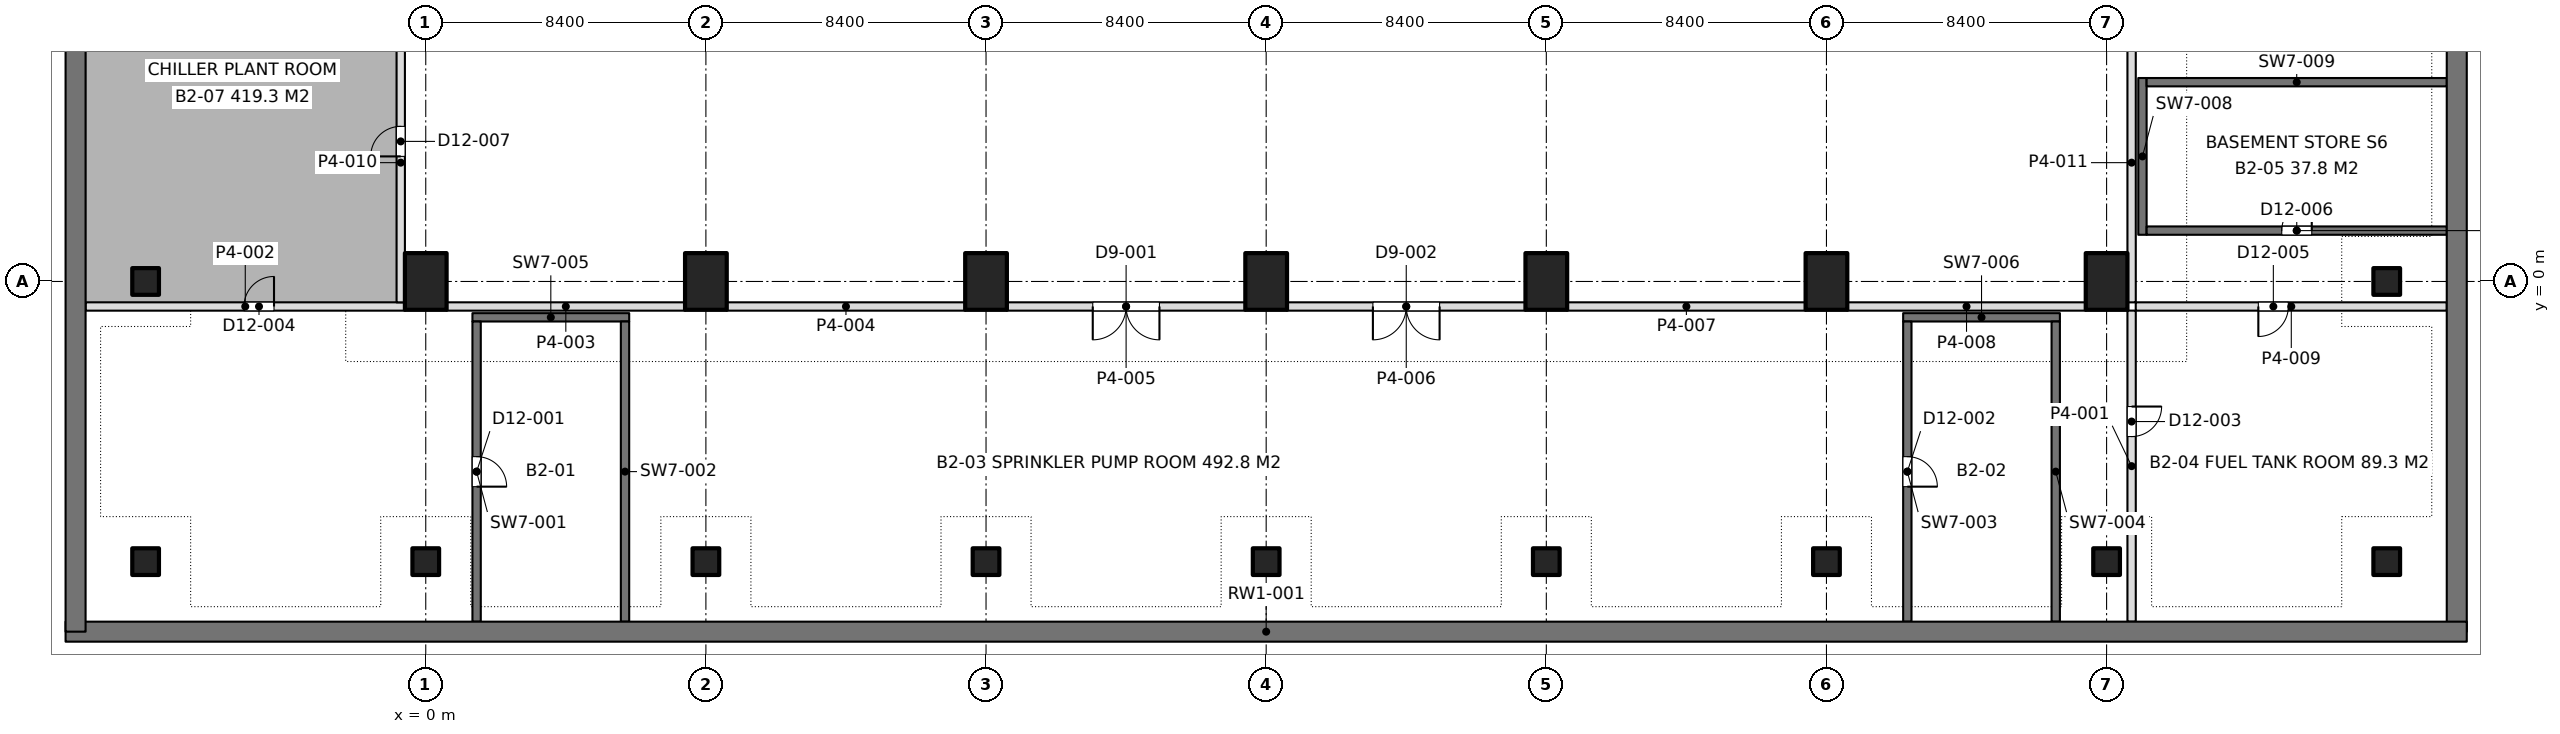
"""IFC4 building model, lengths in metres.
Left out: names, types, materials, properties, quantities, classifications, styles, units other than length and angle.
Written with IfcOpenShell. Run it as: python <this file> out.ifc"""

import sys

from ifc_helpers import new_model, si_unit, direction, frame, frame_2d, origin, origin_with_axes, origin_2d, place, context, subcontext, project, spatial, rectangle, extrude, element, fill, save


model = new_model("IFC4")
c1 = context("Model", 3, precision=1e-05, world=origin(), true_north=direction((0.0, 1.0)))
c2 = subcontext(c1, "Body", "Model", "MODEL_VIEW")
j1 = project(units=[si_unit("LENGTHUNIT", "METRE"), si_unit("PLANEANGLEUNIT", "RADIAN")], contexts=[c1])
p1 = place(None, origin())
s1 = spatial("IfcSite", under=j1, at=p1, CompositionType="ELEMENT")
p2 = place(p1, origin())
s2 = spatial("IfcBuilding", under=s1, at=p2, CompositionType="ELEMENT")
p3 = place(p2, frame((0.0, 0.0, -8.4)))
s3 = spatial("IfcBuildingStorey", under=s2, at=p3, CompositionType="ELEMENT", Elevation=-8.4)
p4 = place(p3, frame((-10.8, -10.5, 0.0), z_axis=(0.0, 0.0, 1.0), x_axis=(1.0, 0.0, 0.0)))
e1 = element("IfcWall", 1, at=p4, inside=s3, PredefinedType="SOLIDWALL", context=c2, shape_type="SweptSolid", body=[
    extrude(rectangle(XDim=72.0, YDim=0.6, at=frame_2d((36.0, 0.0))), origin(), (0.0, 0.0, 1.0), 4.2),
])
for number, where, z_axis, x_axis in (
    (2, (-10.5, -10.5, 0.0), (0.0, 0.0, 1.0), (0.0, 1.0, 0.0)),
    (3, (60.9, -10.5, 0.0), (0.0, 0.0, 1.0), (0.0, 1.0, 0.0)),
):
    element("IfcWall", number, at=place(p3, frame(where, z_axis=z_axis, x_axis=x_axis)), inside=s3, PredefinedType="SOLIDWALL", context=c2, shape_type="SweptSolid", body=[
        extrude(rectangle(XDim=71.4, YDim=0.6, at=frame_2d((35.7, 0.0))), origin(), (0.0, 0.0, 1.0), 4.2),
    ])
for number, where, z_axis, x_axis in (
    (4, (-8.4, -8.4, 0.0), (0.0, 0.0, 1.0), (1.0, 0.0, 0.0)),
    (5, (-8.4, 0.0, 0.0), (0.0, 0.0, 1.0), (1.0, 0.0, 0.0)),
    (6, (0.0, -8.4, 0.0), (0.0, 0.0, 1.0), (1.0, 0.0, 0.0)),
):
    element("IfcColumn", number, at=place(p3, frame(where, z_axis=z_axis, x_axis=x_axis)), inside=s3, PredefinedType="COLUMN", context=c2, shape_type="SweptSolid", body=[
        extrude(rectangle(XDim=0.8, YDim=0.8, at=origin_2d()), origin(), (0.0, 0.0, 1.0), 4.2),
    ])
p5 = place(p3, origin_with_axes())
e7 = element("IfcColumn", 7, at=p5, inside=s3, PredefinedType="COLUMN", context=c2, shape_type="SweptSolid", body=[
    extrude(rectangle(XDim=1.25, YDim=1.7, at=origin_2d()), origin(), (0.0, 0.0, 1.0), 4.2),
])
p6 = place(p3, frame((8.4, -8.4, 0.0), z_axis=(0.0, 0.0, 1.0), x_axis=(1.0, 0.0, 0.0)))
e8 = element("IfcColumn", 8, at=p6, inside=s3, PredefinedType="COLUMN", context=c2, shape_type="SweptSolid", body=[
    extrude(rectangle(XDim=0.8, YDim=0.8, at=origin_2d()), origin(), (0.0, 0.0, 1.0), 4.2),
])
p7 = place(p3, frame((8.4, 0.0, 0.0), z_axis=(0.0, 0.0, 1.0), x_axis=(1.0, 0.0, 0.0)))
e9 = element("IfcColumn", 9, at=p7, inside=s3, PredefinedType="COLUMN", context=c2, shape_type="SweptSolid", body=[
    extrude(rectangle(XDim=1.25, YDim=1.7, at=origin_2d()), origin(), (0.0, 0.0, 1.0), 4.2),
])
p8 = place(p3, frame((16.8, -8.4, 0.0), z_axis=(0.0, 0.0, 1.0), x_axis=(1.0, 0.0, 0.0)))
e10 = element("IfcColumn", 10, at=p8, inside=s3, PredefinedType="COLUMN", context=c2, shape_type="SweptSolid", body=[
    extrude(rectangle(XDim=0.8, YDim=0.8, at=origin_2d()), origin(), (0.0, 0.0, 1.0), 4.2),
])
p9 = place(p3, frame((16.8, 0.0, 0.0), z_axis=(0.0, 0.0, 1.0), x_axis=(1.0, 0.0, 0.0)))
e11 = element("IfcColumn", 11, at=p9, inside=s3, PredefinedType="COLUMN", context=c2, shape_type="SweptSolid", body=[
    extrude(rectangle(XDim=1.25, YDim=1.7, at=origin_2d()), origin(), (0.0, 0.0, 1.0), 4.2),
])
p10 = place(p3, frame((25.2, -8.4, 0.0), z_axis=(0.0, 0.0, 1.0), x_axis=(1.0, 0.0, 0.0)))
e12 = element("IfcColumn", 12, at=p10, inside=s3, PredefinedType="COLUMN", context=c2, shape_type="SweptSolid", body=[
    extrude(rectangle(XDim=0.8, YDim=0.8, at=origin_2d()), origin(), (0.0, 0.0, 1.0), 4.2),
])
p11 = place(p3, frame((25.2, 0.0, 0.0), z_axis=(0.0, 0.0, 1.0), x_axis=(1.0, 0.0, 0.0)))
e13 = element("IfcColumn", 13, at=p11, inside=s3, PredefinedType="COLUMN", context=c2, shape_type="SweptSolid", body=[
    extrude(rectangle(XDim=1.25, YDim=1.7, at=origin_2d()), origin(), (0.0, 0.0, 1.0), 4.2),
])
p12 = place(p3, frame((33.6, -8.4, 0.0), z_axis=(0.0, 0.0, 1.0), x_axis=(1.0, 0.0, 0.0)))
e14 = element("IfcColumn", 14, at=p12, inside=s3, PredefinedType="COLUMN", context=c2, shape_type="SweptSolid", body=[
    extrude(rectangle(XDim=0.8, YDim=0.8, at=origin_2d()), origin(), (0.0, 0.0, 1.0), 4.2),
])
p13 = place(p3, frame((33.6, 0.0, 0.0), z_axis=(0.0, 0.0, 1.0), x_axis=(1.0, 0.0, 0.0)))
e15 = element("IfcColumn", 15, at=p13, inside=s3, PredefinedType="COLUMN", context=c2, shape_type="SweptSolid", body=[
    extrude(rectangle(XDim=1.25, YDim=1.7, at=origin_2d()), origin(), (0.0, 0.0, 1.0), 4.2),
])
p14 = place(p3, frame((42.0, -8.4, 0.0), z_axis=(0.0, 0.0, 1.0), x_axis=(1.0, 0.0, 0.0)))
e16 = element("IfcColumn", 16, at=p14, inside=s3, PredefinedType="COLUMN", context=c2, shape_type="SweptSolid", body=[
    extrude(rectangle(XDim=0.8, YDim=0.8, at=origin_2d()), origin(), (0.0, 0.0, 1.0), 4.2),
])
p15 = place(p3, frame((42.0, 0.0, 0.0), z_axis=(0.0, 0.0, 1.0), x_axis=(1.0, 0.0, 0.0)))
e17 = element("IfcColumn", 17, at=p15, inside=s3, PredefinedType="COLUMN", context=c2, shape_type="SweptSolid", body=[
    extrude(rectangle(XDim=1.25, YDim=1.7, at=origin_2d()), origin(), (0.0, 0.0, 1.0), 4.2),
])
p16 = place(p3, frame((50.4, -8.4, 0.0), z_axis=(0.0, 0.0, 1.0), x_axis=(1.0, 0.0, 0.0)))
e18 = element("IfcColumn", 18, at=p16, inside=s3, PredefinedType="COLUMN", context=c2, shape_type="SweptSolid", body=[
    extrude(rectangle(XDim=0.8, YDim=0.8, at=origin_2d()), origin(), (0.0, 0.0, 1.0), 4.2),
])
p17 = place(p3, frame((50.4, 0.0, 0.0), z_axis=(0.0, 0.0, 1.0), x_axis=(1.0, 0.0, 0.0)))
e19 = element("IfcColumn", 19, at=p17, inside=s3, PredefinedType="COLUMN", context=c2, shape_type="SweptSolid", body=[
    extrude(rectangle(XDim=1.25, YDim=1.7, at=origin_2d()), origin(), (0.0, 0.0, 1.0), 4.2),
])
for number, where, z_axis, x_axis in (
    (20, (58.8, -8.4, 0.0), (0.0, 0.0, 1.0), (1.0, 0.0, 0.0)),
    (21, (58.8, 0.0, 0.0), (0.0, 0.0, 1.0), (1.0, 0.0, 0.0)),
):
    element("IfcColumn", number, at=place(p3, frame(where, z_axis=z_axis, x_axis=x_axis)), inside=s3, PredefinedType="COLUMN", context=c2, shape_type="SweptSolid", body=[
        extrude(rectangle(XDim=0.8, YDim=0.8, at=origin_2d()), origin(), (0.0, 0.0, 1.0), 4.2),
    ])
p18 = place(p3, frame((-10.2, -0.75, 0.0), z_axis=(0.0, 0.0, 1.0), x_axis=(1.0, 0.0, 0.0)))
e22 = element("IfcWall", 22, at=p18, inside=s3, PredefinedType="PARTITIONING", context=c2, shape_type="SweptSolid", body=[
    extrude(rectangle(XDim=9.576, YDim=0.25, at=frame_2d((4.788, 0.0))), origin(), (0.0, 0.0, 1.0), 3.85),
])
p19 = place(p18, frame((4.75, 0.0, 0.0)))
e23 = element("IfcOpeningElement", 23, at=p19, cuts=e22, PredefinedType="OPENING", context=c2, shape_type="SweptSolid", body=[
    extrude(rectangle(XDim=0.9, YDim=2.2, at=frame_2d((0.45, 1.1))), frame((0.0, 0.135, 0.0), z_axis=(0.0, -1.0, 0.0), x_axis=(1.0, 0.0, 0.0)), (0.0, 0.0, 1.0), 0.27),
])
p20 = place(p3, frame((0.624, -0.75, 0.0), z_axis=(0.0, 0.0, 1.0), x_axis=(1.0, 0.0, 0.0)))
e24 = element("IfcWall", 24, at=p20, inside=s3, PredefinedType="PARTITIONING", context=c2, shape_type="SweptSolid", body=[
    extrude(rectangle(XDim=7.152, YDim=0.25, at=frame_2d((3.576, 0.0))), origin(), (0.0, 0.0, 1.0), 3.85),
])
p21 = place(p3, frame((9.024, -0.75, 0.0), z_axis=(0.0, 0.0, 1.0), x_axis=(1.0, 0.0, 0.0)))
e25 = element("IfcWall", 25, at=p21, inside=s3, PredefinedType="PARTITIONING", context=c2, shape_type="SweptSolid", body=[
    extrude(rectangle(XDim=7.152, YDim=0.25, at=frame_2d((3.576, 0.0))), origin(), (0.0, 0.0, 1.0), 3.85),
])
p22 = place(p3, frame((17.424, -0.75, 0.0), z_axis=(0.0, 0.0, 1.0), x_axis=(1.0, 0.0, 0.0)))
e26 = element("IfcWall", 26, at=p22, inside=s3, PredefinedType="PARTITIONING", context=c2, shape_type="SweptSolid", body=[
    extrude(rectangle(XDim=7.152, YDim=0.25, at=frame_2d((3.576, 0.0))), origin(), (0.0, 0.0, 1.0), 3.85),
])
p23 = place(p22, frame((2.576, 0.0, 0.0)))
e27 = element("IfcOpeningElement", 27, at=p23, cuts=e26, PredefinedType="OPENING", context=c2, shape_type="SweptSolid", body=[
    extrude(rectangle(XDim=2.0, YDim=2.4, at=frame_2d((1.0, 1.2))), frame((0.0, 0.135, 0.0), z_axis=(0.0, -1.0, 0.0), x_axis=(1.0, 0.0, 0.0)), (0.0, 0.0, 1.0), 0.27),
])
p24 = place(p3, frame((25.824, -0.75, 0.0), z_axis=(0.0, 0.0, 1.0), x_axis=(1.0, 0.0, 0.0)))
e28 = element("IfcWall", 28, at=p24, inside=s3, PredefinedType="PARTITIONING", context=c2, shape_type="SweptSolid", body=[
    extrude(rectangle(XDim=7.152, YDim=0.25, at=frame_2d((3.576, 0.0))), origin(), (0.0, 0.0, 1.0), 3.85),
])
p25 = place(p24, frame((2.576, 0.0, 0.0)))
e29 = element("IfcOpeningElement", 29, at=p25, cuts=e28, PredefinedType="OPENING", context=c2, shape_type="SweptSolid", body=[
    extrude(rectangle(XDim=2.0, YDim=2.4, at=frame_2d((1.0, 1.2))), frame((0.0, 0.135, 0.0), z_axis=(0.0, -1.0, 0.0), x_axis=(1.0, 0.0, 0.0)), (0.0, 0.0, 1.0), 0.27),
])
for number, where, z_axis, x_axis in (
    (30, (34.224, -0.75, 0.0), (0.0, 0.0, 1.0), (1.0, 0.0, 0.0)),
    (31, (42.624, -0.75, 0.0), (0.0, 0.0, 1.0), (1.0, 0.0, 0.0)),
):
    element("IfcWall", number, at=place(p3, frame(where, z_axis=z_axis, x_axis=x_axis)), inside=s3, PredefinedType="PARTITIONING", context=c2, shape_type="SweptSolid", body=[
        extrude(rectangle(XDim=7.152, YDim=0.25, at=frame_2d((3.576, 0.0))), origin(), (0.0, 0.0, 1.0), 3.85),
    ])
p26 = place(p3, frame((51.274, -0.75, 0.0), z_axis=(0.0, 0.0, 1.0), x_axis=(1.0, 0.0, 0.0)))
e32 = element("IfcWall", 32, at=p26, inside=s3, PredefinedType="PARTITIONING", context=c2, shape_type="SweptSolid", body=[
    extrude(rectangle(XDim=9.328, YDim=0.25, at=frame_2d((4.664, 0.0))), origin(), (0.0, 0.0, 1.0), 3.85),
])
p27 = place(p26, frame((3.676, 0.0, 0.0)))
e33 = element("IfcOpeningElement", 33, at=p27, cuts=e32, PredefinedType="OPENING", context=c2, shape_type="SweptSolid", body=[
    extrude(rectangle(XDim=0.9, YDim=2.2, at=frame_2d((0.45, 1.1))), frame((0.0, 0.135, 0.0), z_axis=(0.0, -1.0, 0.0), x_axis=(1.0, 0.0, 0.0)), (0.0, 0.0, 1.0), 0.27),
])
p28 = place(p3, frame((-0.75, -0.626, 0.0), z_axis=(0.0, 0.0, 1.0), x_axis=(0.0, 1.0, 0.0)))
e34 = element("IfcWall", 34, at=p28, inside=s3, PredefinedType="PARTITIONING", context=c2, shape_type="SweptSolid", body=[
    extrude(rectangle(XDim=8.377, YDim=0.25, at=frame_2d((4.188, 0.0))), origin(), (0.0, 0.0, 1.0), 3.85),
])
p29 = place(p28, frame((4.376, 0.0, 0.0)))
e35 = element("IfcOpeningElement", 35, at=p29, cuts=e34, PredefinedType="OPENING", context=c2, shape_type="SweptSolid", body=[
    extrude(rectangle(XDim=0.9, YDim=2.2, at=frame_2d((0.45, 1.1))), frame((0.0, 0.135, 0.0), z_axis=(0.0, -1.0, 0.0), x_axis=(1.0, 0.0, 0.0)), (0.0, 0.0, 1.0), 0.27),
])
p30 = place(p3, frame((51.15, -0.626, 0.0), z_axis=(0.0, 0.0, 1.0), x_axis=(0.0, 1.0, 0.0)))
e36 = element("IfcWall", 36, at=p30, inside=s3, PredefinedType="PARTITIONING", context=c2, shape_type="SweptSolid", body=[
    extrude(rectangle(XDim=8.377, YDim=0.25, at=frame_2d((4.188, 0.0))), origin(), (0.0, 0.0, 1.0), 3.85),
])
p31 = place(p3, frame((51.15, -10.2, 0.0), z_axis=(0.0, 0.0, 1.0), x_axis=(0.0, 1.0, 0.0)))
e37 = element("IfcWall", 37, at=p31, inside=s3, PredefinedType="PARTITIONING", context=c2, shape_type="SweptSolid", body=[
    extrude(rectangle(XDim=9.326, YDim=0.25, at=frame_2d((4.663, 0.0))), origin(), (0.0, 0.0, 1.0), 3.85),
])
p32 = place(p31, frame((5.55, 0.0, 0.0)))
e38 = element("IfcOpeningElement", 38, at=p32, cuts=e37, PredefinedType="OPENING", context=c2, shape_type="SweptSolid", body=[
    extrude(rectangle(XDim=0.9, YDim=2.2, at=frame_2d((0.45, 1.1))), frame((0.0, 0.135, 0.0), z_axis=(0.0, -1.0, 0.0), x_axis=(1.0, 0.0, 0.0)), (0.0, 0.0, 1.0), 0.27),
])
p33 = place(p3, frame((1.525, -10.202, 0.0), z_axis=(0.0, 0.0, 1.0), x_axis=(0.0, 1.0, 0.0)))
e39 = element("IfcWall", 39, at=p33, inside=s3, PredefinedType="SOLIDWALL", context=c2, shape_type="SweptSolid", body=[
    extrude(rectangle(XDim=9.002, YDim=0.25, at=frame_2d((4.501, 0.0))), origin(), (0.0, 0.0, 1.0), 4.2),
])
p34 = place(p33, frame((4.05, 0.0, 0.0)))
e40 = element("IfcOpeningElement", 40, at=p34, cuts=e39, PredefinedType="OPENING", context=c2, shape_type="SweptSolid", body=[
    extrude(rectangle(XDim=0.9, YDim=2.2, at=frame_2d((0.45, 1.1))), frame((0.0, 0.135, 0.0), z_axis=(0.0, -1.0, 0.0), x_axis=(1.0, 0.0, 0.0)), (0.0, 0.0, 1.0), 0.27),
])
p35 = place(p3, frame((5.975, -10.202, 0.0), z_axis=(0.0, 0.0, 1.0), x_axis=(0.0, 1.0, 0.0)))
e41 = element("IfcWall", 41, at=p35, inside=s3, PredefinedType="SOLIDWALL", context=c2, shape_type="SweptSolid", body=[
    extrude(rectangle(XDim=9.002, YDim=0.25, at=frame_2d((4.501, 0.0))), origin(), (0.0, 0.0, 1.0), 4.2),
])
p36 = place(p3, frame((1.4, -1.075, 0.0), z_axis=(0.0, 0.0, 1.0), x_axis=(1.0, 0.0, 0.0)))
e42 = element("IfcWall", 42, at=p36, inside=s3, PredefinedType="SOLIDWALL", context=c2, shape_type="SweptSolid", body=[
    extrude(rectangle(XDim=4.7, YDim=0.25, at=frame_2d((2.35, 0.0))), origin(), (0.0, 0.0, 1.0), 4.2),
])
p37 = place(p3, frame((44.425, -10.202, 0.0), z_axis=(0.0, 0.0, 1.0), x_axis=(0.0, 1.0, 0.0)))
e43 = element("IfcWall", 43, at=p37, inside=s3, PredefinedType="SOLIDWALL", context=c2, shape_type="SweptSolid", body=[
    extrude(rectangle(XDim=9.002, YDim=0.25, at=frame_2d((4.501, 0.0))), origin(), (0.0, 0.0, 1.0), 4.2),
])
p38 = place(p37, frame((4.05, 0.0, 0.0)))
e44 = element("IfcOpeningElement", 44, at=p38, cuts=e43, PredefinedType="OPENING", context=c2, shape_type="SweptSolid", body=[
    extrude(rectangle(XDim=0.9, YDim=2.2, at=frame_2d((0.45, 1.1))), frame((0.0, 0.135, 0.0), z_axis=(0.0, -1.0, 0.0), x_axis=(1.0, 0.0, 0.0)), (0.0, 0.0, 1.0), 0.27),
])
p39 = place(p3, frame((48.875, -10.202, 0.0), z_axis=(0.0, 0.0, 1.0), x_axis=(0.0, 1.0, 0.0)))
e45 = element("IfcWall", 45, at=p39, inside=s3, PredefinedType="SOLIDWALL", context=c2, shape_type="SweptSolid", body=[
    extrude(rectangle(XDim=9.002, YDim=0.25, at=frame_2d((4.501, 0.0))), origin(), (0.0, 0.0, 1.0), 4.2),
])
p40 = place(p3, frame((44.3, -1.075, 0.0), z_axis=(0.0, 0.0, 1.0), x_axis=(1.0, 0.0, 0.0)))
e46 = element("IfcWall", 46, at=p40, inside=s3, PredefinedType="SOLIDWALL", context=c2, shape_type="SweptSolid", body=[
    extrude(rectangle(XDim=4.7, YDim=0.25, at=frame_2d((2.35, 0.0))), origin(), (0.0, 0.0, 1.0), 4.2),
])
p41 = place(p3, frame((60.602, 1.525, 0.0), z_axis=(0.0, 0.0, 1.0), x_axis=(-1.0, 0.0, 0.0)))
e47 = element("IfcWall", 47, at=p41, inside=s3, PredefinedType="SOLIDWALL", context=c2, shape_type="SweptSolid", body=[
    extrude(rectangle(XDim=9.002, YDim=0.25, at=frame_2d((4.501, 0.0))), origin(), (0.0, 0.0, 1.0), 4.2),
])
p42 = place(p41, frame((4.05, 0.0, 0.0)))
e48 = element("IfcOpeningElement", 48, at=p42, cuts=e47, PredefinedType="OPENING", context=c2, shape_type="SweptSolid", body=[
    extrude(rectangle(XDim=0.9, YDim=2.2, at=frame_2d((0.45, 1.1))), frame((0.0, 0.135, 0.0), z_axis=(0.0, -1.0, 0.0), x_axis=(1.0, 0.0, 0.0)), (0.0, 0.0, 1.0), 0.27),
])
p43 = place(p3, frame((60.602, 5.975, 0.0), z_axis=(0.0, 0.0, 1.0), x_axis=(-1.0, 0.0, 0.0)))
e49 = element("IfcWall", 49, at=p43, inside=s3, PredefinedType="SOLIDWALL", context=c2, shape_type="SweptSolid", body=[
    extrude(rectangle(XDim=9.002, YDim=0.25, at=frame_2d((4.501, 0.0))), origin(), (0.0, 0.0, 1.0), 4.2),
])
p44 = place(p3, frame((51.475, 1.4, 0.0), z_axis=(0.0, 0.0, 1.0), x_axis=(0.0, 1.0, 0.0)))
e50 = element("IfcWall", 50, at=p44, inside=s3, PredefinedType="SOLIDWALL", context=c2, shape_type="SweptSolid", body=[
    extrude(rectangle(XDim=4.7, YDim=0.25, at=frame_2d((2.35, 0.0))), origin(), (0.0, 0.0, 1.0), 4.2),
])
p45 = place(p19, origin())
e51 = element("IfcDoor", 51, at=p45, inside=s3, OperationType="SINGLE_SWING_RIGHT", PredefinedType="DOOR", context=c2, shape_type="SweptSolid", body=[
    extrude(rectangle(XDim=0.9, YDim=2.2, at=frame_2d((0.45, 1.1))), frame((0.0, 0.025, 0.0), z_axis=(0.0, -1.0, 0.0), x_axis=(1.0, 0.0, 0.0)), (0.0, 0.0, 1.0), 0.05),
])
fill(e23, e51)
p46 = place(p23, frame((2.0, 0.0, 0.0), z_axis=(0.0, 0.0, 1.0), x_axis=(-1.0, 0.0, 0.0)))
e52 = element("IfcDoor", 52, at=p46, inside=s3, OperationType="DOUBLE_DOOR_SINGLE_SWING", PredefinedType="DOOR", context=c2, shape_type="SweptSolid", body=[
    extrude(rectangle(XDim=2.0, YDim=2.4, at=frame_2d((1.0, 1.2))), frame((0.0, 0.025, 0.0), z_axis=(0.0, -1.0, 0.0), x_axis=(1.0, 0.0, 0.0)), (0.0, 0.0, 1.0), 0.05),
])
fill(e27, e52)
p47 = place(p25, frame((2.0, 0.0, 0.0), z_axis=(0.0, 0.0, 1.0), x_axis=(-1.0, 0.0, 0.0)))
e53 = element("IfcDoor", 53, at=p47, inside=s3, OperationType="DOUBLE_DOOR_SINGLE_SWING", PredefinedType="DOOR", context=c2, shape_type="SweptSolid", body=[
    extrude(rectangle(XDim=2.0, YDim=2.4, at=frame_2d((1.0, 1.2))), frame((0.0, 0.025, 0.0), z_axis=(0.0, -1.0, 0.0), x_axis=(1.0, 0.0, 0.0)), (0.0, 0.0, 1.0), 0.05),
])
fill(e29, e53)
p48 = place(p27, frame((0.9, 0.0, 0.0), z_axis=(0.0, 0.0, 1.0), x_axis=(-1.0, 0.0, 0.0)))
e54 = element("IfcDoor", 54, at=p48, inside=s3, OperationType="SINGLE_SWING_RIGHT", PredefinedType="DOOR", context=c2, shape_type="SweptSolid", body=[
    extrude(rectangle(XDim=0.9, YDim=2.2, at=frame_2d((0.45, 1.1))), frame((0.0, 0.025, 0.0), z_axis=(0.0, -1.0, 0.0), x_axis=(1.0, 0.0, 0.0)), (0.0, 0.0, 1.0), 0.05),
])
fill(e33, e54)
p49 = place(p29, origin())
e55 = element("IfcDoor", 55, at=p49, inside=s3, OperationType="SINGLE_SWING_LEFT", PredefinedType="DOOR", context=c2, shape_type="SweptSolid", body=[
    extrude(rectangle(XDim=0.9, YDim=2.2, at=frame_2d((0.45, 1.1))), frame((0.0, 0.025, 0.0), z_axis=(0.0, -1.0, 0.0), x_axis=(1.0, 0.0, 0.0)), (0.0, 0.0, 1.0), 0.05),
])
fill(e35, e55)
p50 = place(p32, frame((0.9, 0.0, 0.0), z_axis=(0.0, 0.0, 1.0), x_axis=(-1.0, 0.0, 0.0)))
e56 = element("IfcDoor", 56, at=p50, inside=s3, OperationType="SINGLE_SWING_LEFT", PredefinedType="DOOR", context=c2, shape_type="SweptSolid", body=[
    extrude(rectangle(XDim=0.9, YDim=2.2, at=frame_2d((0.45, 1.1))), frame((0.0, 0.025, 0.0), z_axis=(0.0, -1.0, 0.0), x_axis=(1.0, 0.0, 0.0)), (0.0, 0.0, 1.0), 0.05),
])
fill(e38, e56)
p51 = place(p34, frame((0.9, 0.0, 0.0), z_axis=(0.0, 0.0, 1.0), x_axis=(-1.0, 0.0, 0.0)))
e57 = element("IfcDoor", 57, at=p51, inside=s3, OperationType="SINGLE_SWING_RIGHT", PredefinedType="DOOR", context=c2, shape_type="SweptSolid", body=[
    extrude(rectangle(XDim=0.9, YDim=2.2, at=frame_2d((0.45, 1.1))), frame((0.0, 0.025, 0.0), z_axis=(0.0, -1.0, 0.0), x_axis=(1.0, 0.0, 0.0)), (0.0, 0.0, 1.0), 0.05),
])
fill(e40, e57)
p52 = place(p38, frame((0.9, 0.0, 0.0), z_axis=(0.0, 0.0, 1.0), x_axis=(-1.0, 0.0, 0.0)))
e58 = element("IfcDoor", 58, at=p52, inside=s3, OperationType="SINGLE_SWING_RIGHT", PredefinedType="DOOR", context=c2, shape_type="SweptSolid", body=[
    extrude(rectangle(XDim=0.9, YDim=2.2, at=frame_2d((0.45, 1.1))), frame((0.0, 0.025, 0.0), z_axis=(0.0, -1.0, 0.0), x_axis=(1.0, 0.0, 0.0)), (0.0, 0.0, 1.0), 0.05),
])
fill(e44, e58)
p53 = place(p42, frame((0.9, 0.0, 0.0), z_axis=(0.0, 0.0, 1.0), x_axis=(-1.0, 0.0, 0.0)))
e59 = element("IfcDoor", 59, at=p53, inside=s3, OperationType="SINGLE_SWING_RIGHT", PredefinedType="DOOR", context=c2, shape_type="SweptSolid", body=[
    extrude(rectangle(XDim=0.9, YDim=2.2, at=frame_2d((0.45, 1.1))), frame((0.0, 0.025, 0.0), z_axis=(0.0, -1.0, 0.0), x_axis=(1.0, 0.0, 0.0)), (0.0, 0.0, 1.0), 0.05),
])
fill(e48, e59)
save(model, sys.argv[1])
